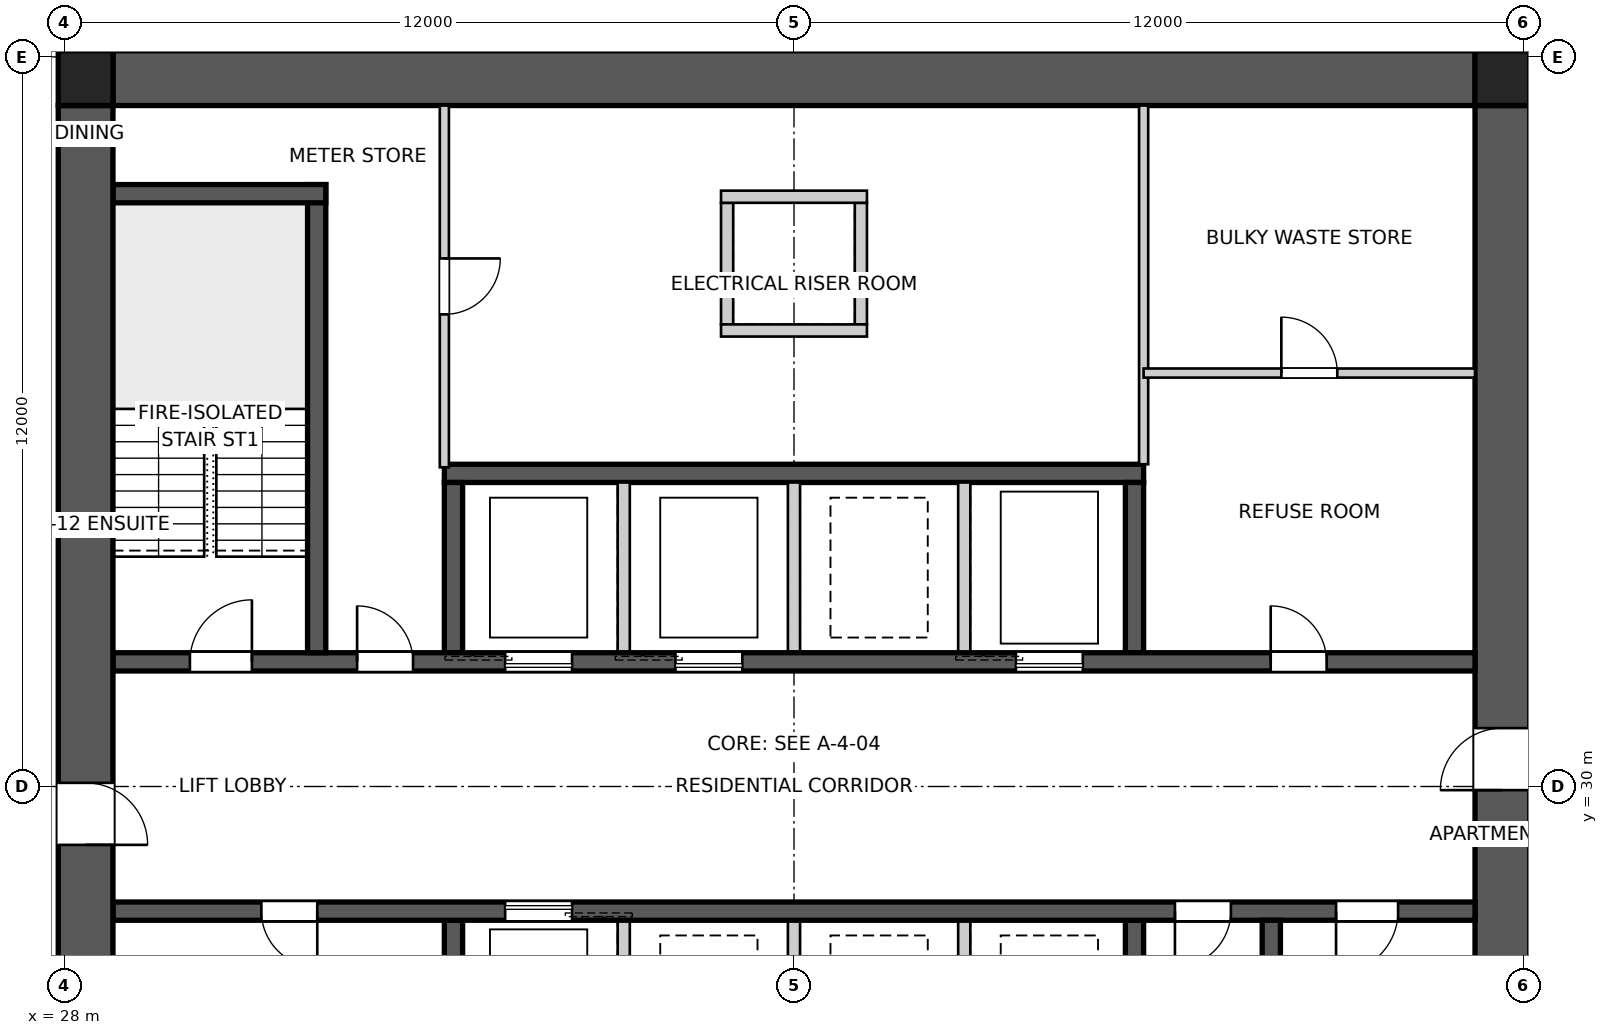
"""IFC4 building model, lengths in metres.
Left out: names, types, materials, properties, quantities, classifications, styles, units other than length and angle.
Written with IfcOpenShell. Run it as: python <this file> out.ifc"""

import sys

from ifc_helpers import new_model, si_unit, direction, frame, frame_2d, origin, origin_2d, place, context, subcontext, project, spatial, polyline, rectangle, outline, extrude, element, fill, save


model = new_model("IFC4")
c1 = context("Model", 3, precision=1e-05, world=origin(), true_north=direction((0.0, 1.0)))
c2 = subcontext(c1, "Body", "Model", "MODEL_VIEW")
j1 = project(units=[si_unit("LENGTHUNIT", "METRE"), si_unit("PLANEANGLEUNIT", "RADIAN")], contexts=[c1])
p1 = place(None, origin())
s1 = spatial("IfcSite", under=j1, at=p1, CompositionType="ELEMENT")
p2 = place(p1, origin())
s2 = spatial("IfcBuilding", under=s1, at=p2, CompositionType="ELEMENT")
p3 = place(p2, frame((0.0, 0.0, 21.8)))
s3 = spatial("IfcBuildingStorey", under=s2, at=p3, CompositionType="ELEMENT", Elevation=21.8)
p4 = place(p3, frame((28.8, 41.65, 0.0), z_axis=(0.0, 0.0, 1.0), x_axis=(1.0, 0.0, 0.0)))
e1 = element("IfcWall", 1, at=p4, inside=s3, PredefinedType="SHEAR", context=c2, shape_type="SweptSolid", body=[
    extrude(outline(polyline([(0.0, -0.45), (22.4, -0.45), (22.4, -0.025), (22.85, -0.025), (22.85, 0.025), (22.4, 0.025), (22.4, 0.45), (0.0, 0.45), (0.0, 0.025), (-0.45, 0.025), (-0.45, -0.025), (0.0, -0.025), (0.0, -0.45)])), origin(), (0.0, 0.0, 1.0), 3.4),
])
p5 = place(p3, frame((51.65, 18.8, 0.0), z_axis=(0.0, 0.0, 1.0), x_axis=(0.0, 1.0, 0.0)))
e2 = element("IfcWall", 2, at=p5, inside=s3, PredefinedType="SHEAR", context=c2, shape_type="SweptSolid", body=[
    extrude(outline(polyline([(0.0, -0.45), (22.4, -0.45), (22.4, -0.025), (22.85, -0.025), (22.85, 0.025), (22.4, 0.025), (22.4, 0.45), (0.0, 0.45), (0.0, 0.025), (-0.45, 0.025), (-0.45, -0.025), (0.0, -0.025), (0.0, -0.45)])), origin(), (0.0, 0.0, 1.0), 3.4),
])
p6 = place(p5, frame((11.14, 0.0, 0.0)))
e3 = element("IfcOpeningElement", 3, at=p6, cuts=e2, PredefinedType="OPENING", context=c2, shape_type="SweptSolid", body=[
    extrude(rectangle(XDim=1.02, YDim=2.4, at=frame_2d((0.51, 1.2))), frame((0.0, 0.46, 0.0), z_axis=(0.0, -1.0, 0.0), x_axis=(1.0, 0.0, 0.0)), (0.0, 0.0, 1.0), 0.92),
])
p7 = place(p3, frame((28.35, 41.2, 0.0), z_axis=(0.0, 0.0, 1.0), x_axis=(0.0, -1.0, 0.0)))
e4 = element("IfcWall", 4, at=p7, inside=s3, PredefinedType="SHEAR", context=c2, shape_type="SweptSolid", body=[
    extrude(outline(polyline([(0.0, -0.45), (22.4, -0.45), (22.4, -0.025), (22.85, -0.025), (22.85, 0.025), (22.4, 0.025), (22.4, 0.45), (0.0, 0.45), (0.0, 0.025), (-0.45, 0.025), (-0.45, -0.025), (0.0, -0.025), (0.0, -0.45)])), origin(), (0.0, 0.0, 1.0), 3.4),
])
p8 = place(p7, frame((11.14, 0.0, 0.0)))
e5 = element("IfcOpeningElement", 5, at=p8, cuts=e4, PredefinedType="OPENING", context=c2, shape_type="SweptSolid", body=[
    extrude(rectangle(XDim=1.02, YDim=2.4, at=frame_2d((0.51, 1.2))), frame((0.0, 0.46, 0.0), z_axis=(0.0, -1.0, 0.0), x_axis=(1.0, 0.0, 0.0)), (0.0, 0.0, 1.0), 0.92),
])
p9 = place(p3, frame((28.8, 32.05, 0.0), z_axis=(0.0, 0.0, 1.0), x_axis=(1.0, 0.0, 0.0)))
e6 = element("IfcWall", 6, at=p9, inside=s3, PredefinedType="SHEAR", context=c2, shape_type="SweptSolid", body=[
    extrude(rectangle(XDim=22.4, YDim=0.3, at=frame_2d((11.2, 0.0))), origin(), (0.0, 0.0, 1.0), 3.4),
])
p10 = place(p9, frame((19.04, 0.0, 0.0)))
e7 = element("IfcOpeningElement", 7, at=p10, cuts=e6, PredefinedType="OPENING", context=c2, shape_type="SweptSolid", body=[
    extrude(rectangle(XDim=0.92, YDim=2.1, at=frame_2d((0.46, 1.05))), frame((0.0, 0.16, 0.0), z_axis=(0.0, -1.0, 0.0), x_axis=(1.0, 0.0, 0.0)), (0.0, 0.0, 1.0), 0.32),
])
p11 = place(p9, frame((1.265, 0.0, 0.0)))
e8 = element("IfcOpeningElement", 8, at=p11, cuts=e6, PredefinedType="OPENING", context=c2, shape_type="SweptSolid", body=[
    extrude(rectangle(XDim=1.02, YDim=2.1, at=frame_2d((0.51, 1.05))), frame((0.0, 0.16, 0.0), z_axis=(0.0, -1.0, 0.0), x_axis=(1.0, 0.0, 0.0)), (0.0, 0.0, 1.0), 0.32),
])
p12 = place(p9, frame((4.015, 0.0, 0.0)))
e9 = element("IfcOpeningElement", 9, at=p12, cuts=e6, PredefinedType="OPENING", context=c2, shape_type="SweptSolid", body=[
    extrude(rectangle(XDim=0.92, YDim=2.1, at=frame_2d((0.46, 1.05))), frame((0.0, 0.16, 0.0), z_axis=(0.0, -1.0, 0.0), x_axis=(1.0, 0.0, 0.0)), (0.0, 0.0, 1.0), 0.32),
])
p13 = place(p9, frame((6.45, 0.0, 0.0)))
e10 = element("IfcOpeningElement", 10, at=p13, cuts=e6, PredefinedType="OPENING", context=c2, shape_type="SweptSolid", body=[
    extrude(rectangle(XDim=1.1, YDim=2.1, at=frame_2d((0.55, 1.05))), frame((0.0, 0.16, 0.0), z_axis=(0.0, -1.0, 0.0), x_axis=(1.0, 0.0, 0.0)), (0.0, 0.0, 1.0), 0.32),
])
p14 = place(p9, frame((9.25, 0.0, 0.0)))
e11 = element("IfcOpeningElement", 11, at=p14, cuts=e6, PredefinedType="OPENING", context=c2, shape_type="SweptSolid", body=[
    extrude(rectangle(XDim=1.1, YDim=2.1, at=frame_2d((0.55, 1.05))), frame((0.0, 0.16, 0.0), z_axis=(0.0, -1.0, 0.0), x_axis=(1.0, 0.0, 0.0)), (0.0, 0.0, 1.0), 0.32),
])
p15 = place(p9, frame((14.85, 0.0, 0.0)))
e12 = element("IfcOpeningElement", 12, at=p15, cuts=e6, PredefinedType="OPENING", context=c2, shape_type="SweptSolid", body=[
    extrude(rectangle(XDim=1.1, YDim=2.1, at=frame_2d((0.55, 1.05))), frame((0.0, 0.16, 0.0), z_axis=(0.0, -1.0, 0.0), x_axis=(1.0, 0.0, 0.0)), (0.0, 0.0, 1.0), 0.32),
])
p16 = place(p3, frame((51.2, 27.95, 0.0), z_axis=(0.0, 0.0, 1.0), x_axis=(-1.0, 0.0, 0.0)))
e13 = element("IfcWall", 13, at=p16, inside=s3, PredefinedType="SHEAR", context=c2, shape_type="SweptSolid", body=[
    extrude(rectangle(XDim=22.4, YDim=0.3, at=frame_2d((11.2, 0.0))), origin(), (0.0, 0.0, 1.0), 3.4),
])
p17 = place(p16, frame((19.04, 0.0, 0.0)))
e14 = element("IfcOpeningElement", 14, at=p17, cuts=e13, PredefinedType="OPENING", context=c2, shape_type="SweptSolid", body=[
    extrude(rectangle(XDim=0.92, YDim=2.1, at=frame_2d((0.46, 1.05))), frame((0.0, 0.16, 0.0), z_axis=(0.0, -1.0, 0.0), x_axis=(1.0, 0.0, 0.0)), (0.0, 0.0, 1.0), 0.32),
])
p18 = place(p16, frame((1.265, 0.0, 0.0)))
e15 = element("IfcOpeningElement", 15, at=p18, cuts=e13, PredefinedType="OPENING", context=c2, shape_type="SweptSolid", body=[
    extrude(rectangle(XDim=1.02, YDim=2.1, at=frame_2d((0.51, 1.05))), frame((0.0, 0.16, 0.0), z_axis=(0.0, -1.0, 0.0), x_axis=(1.0, 0.0, 0.0)), (0.0, 0.0, 1.0), 0.32),
])
p19 = place(p16, frame((4.015, 0.0, 0.0)))
e16 = element("IfcOpeningElement", 16, at=p19, cuts=e13, PredefinedType="OPENING", context=c2, shape_type="SweptSolid", body=[
    extrude(rectangle(XDim=0.92, YDim=2.1, at=frame_2d((0.46, 1.05))), frame((0.0, 0.16, 0.0), z_axis=(0.0, -1.0, 0.0), x_axis=(1.0, 0.0, 0.0)), (0.0, 0.0, 1.0), 0.32),
])
p20 = place(p16, frame((14.85, 0.0, 0.0)))
e17 = element("IfcOpeningElement", 17, at=p20, cuts=e13, PredefinedType="OPENING", context=c2, shape_type="SweptSolid", body=[
    extrude(rectangle(XDim=1.1, YDim=2.1, at=frame_2d((0.55, 1.05))), frame((0.0, 0.16, 0.0), z_axis=(0.0, -1.0, 0.0), x_axis=(1.0, 0.0, 0.0)), (0.0, 0.0, 1.0), 0.32),
])
p21 = place(p3, frame((34.25, 35.15, 0.0), z_axis=(0.0, 0.0, 1.0), x_axis=(1.0, 0.0, 0.0)))
e18 = element("IfcWall", 18, at=p21, inside=s3, PredefinedType="SHEAR", context=c2, shape_type="SweptSolid", body=[
    extrude(rectangle(XDim=11.5, YDim=0.3, at=frame_2d((5.75, 0.0))), origin(), (0.0, 0.0, 1.0), 3.4),
])
for number, where, z_axis, x_axis in (
    (19, (34.4, 32.2, 0.0), (0.0, 0.0, 1.0), (0.0, 1.0, 0.0)),
    (20, (45.6, 27.8, 0.0), (0.0, 0.0, 1.0), (0.0, -1.0, 0.0)),
):
    element("IfcWall", number, at=place(p3, frame(where, z_axis=z_axis, x_axis=x_axis)), inside=s3, PredefinedType="SHEAR", context=c2, shape_type="SweptSolid", body=[
        extrude(rectangle(XDim=2.8, YDim=0.3, at=frame_2d((1.4, 0.0))), origin(), (0.0, 0.0, 1.0), 3.4),
    ])
for number, where, z_axis, x_axis in (
    (21, (37.2, 32.2, 0.0), (0.0, 0.0, 1.0), (0.0, 1.0, 0.0)),
    (22, (42.8, 27.8, 0.0), (0.0, 0.0, 1.0), (0.0, -1.0, 0.0)),
    (23, (40.0, 32.2, 0.0), (0.0, 0.0, 1.0), (0.0, 1.0, 0.0)),
    (24, (40.0, 27.8, 0.0), (0.0, 0.0, 1.0), (0.0, -1.0, 0.0)),
    (25, (42.8, 32.2, 0.0), (0.0, 0.0, 1.0), (0.0, 1.0, 0.0)),
    (26, (37.2, 27.8, 0.0), (0.0, 0.0, 1.0), (0.0, -1.0, 0.0)),
):
    element("IfcWall", number, at=place(p3, frame(where, z_axis=z_axis, x_axis=x_axis)), inside=s3, PredefinedType="SOLIDWALL", context=c2, shape_type="SweptSolid", body=[
        extrude(rectangle(XDim=2.8, YDim=0.2, at=frame_2d((1.4, 0.0))), origin(), (0.0, 0.0, 1.0), 3.4),
    ])
for number, where, z_axis, x_axis in (
    (27, (45.6, 32.2, 0.0), (0.0, 0.0, 1.0), (0.0, 1.0, 0.0)),
    (28, (34.4, 27.8, 0.0), (0.0, 0.0, 1.0), (0.0, -1.0, 0.0)),
):
    element("IfcWall", number, at=place(p3, frame(where, z_axis=z_axis, x_axis=x_axis)), inside=s3, PredefinedType="SHEAR", context=c2, shape_type="SweptSolid", body=[
        extrude(rectangle(XDim=2.8, YDim=0.3, at=frame_2d((1.4, 0.0))), origin(), (0.0, 0.0, 1.0), 3.4),
    ])
p22 = place(p3, frame((32.15, 32.2, 0.0), z_axis=(0.0, 0.0, 1.0), x_axis=(0.0, 1.0, 0.0)))
e29 = element("IfcWall", 29, at=p22, inside=s3, PredefinedType="SHEAR", context=c2, shape_type="SweptSolid", body=[
    extrude(rectangle(XDim=7.7, YDim=0.3, at=frame_2d((3.85, 0.0))), origin(), (0.0, 0.0, 1.0), 3.4),
])
p23 = place(p3, frame((28.8, 39.75, 0.0), z_axis=(0.0, 0.0, 1.0), x_axis=(1.0, 0.0, 0.0)))
e30 = element("IfcWall", 30, at=p23, inside=s3, PredefinedType="SHEAR", context=c2, shape_type="SweptSolid", body=[
    extrude(rectangle(XDim=3.5, YDim=0.3, at=frame_2d((1.75, 0.0))), origin(), (0.0, 0.0, 1.0), 3.4),
])
p24 = place(p3, frame((47.85, 27.8, 0.0), z_axis=(0.0, 0.0, 1.0), x_axis=(0.0, -1.0, 0.0)))
e31 = element("IfcWall", 31, at=p24, inside=s3, PredefinedType="SHEAR", context=c2, shape_type="SweptSolid", body=[
    extrude(rectangle(XDim=7.7, YDim=0.3, at=frame_2d((3.85, 0.0))), origin(), (0.0, 0.0, 1.0), 3.4),
])
for number, where, z_axis, x_axis in (
    (32, (38.9, 37.6, 0.0), (0.0, 0.0, 1.0), (0.0, 1.0, 0.0)),
    (33, (41.1, 37.6, 0.0), (0.0, 0.0, 1.0), (0.0, 1.0, 0.0)),
):
    element("IfcWall", number, at=place(p3, frame(where, z_axis=z_axis, x_axis=x_axis)), inside=s3, PredefinedType="SOLIDWALL", context=c2, shape_type="SweptSolid", body=[
        extrude(rectangle(XDim=2.0, YDim=0.2, at=frame_2d((1.0, 0.0))), origin(), (0.0, 0.0, 1.0), 3.4),
    ])
for number, where, z_axis, x_axis in (
    (34, (38.8, 37.5, 0.0), (0.0, 0.0, 1.0), (1.0, 0.0, 0.0)),
    (35, (38.8, 39.7, 0.0), (0.0, 0.0, 1.0), (1.0, 0.0, 0.0)),
):
    element("IfcWall", number, at=place(p3, frame(where, z_axis=z_axis, x_axis=x_axis)), inside=s3, PredefinedType="SOLIDWALL", context=c2, shape_type="SweptSolid", body=[
        extrude(rectangle(XDim=2.4, YDim=0.2, at=frame_2d((1.2, 0.0))), origin(), (0.0, 0.0, 1.0), 3.4),
    ])
for number, where, z_axis, x_axis in (
    (36, (51.65, 41.65, 0.0), (0.0, 0.0, 1.0), (1.0, 0.0, 0.0)),
    (37, (28.35, 41.65, 0.0), (0.0, 0.0, 1.0), (1.0, 0.0, 0.0)),
):
    element("IfcColumn", number, at=place(p3, frame(where, z_axis=z_axis, x_axis=x_axis)), inside=s3, PredefinedType="COLUMN", context=c2, shape_type="SweptSolid", body=[
        extrude(rectangle(XDim=0.9, YDim=0.9, at=origin_2d()), origin(), (0.0, 0.0, 1.0), 3.4),
    ])
p25 = place(p3, frame((34.25, 41.2, 0.0), z_axis=(0.0, 0.0, 1.0), x_axis=(0.0, -1.0, 0.0)))
e38 = element("IfcWall", 38, at=p25, inside=s3, PredefinedType="SOLIDWALL", context=c2, shape_type="SweptSolid", body=[
    extrude(rectangle(XDim=5.95, YDim=0.15, at=frame_2d((2.975, 0.0))), origin(), (0.0, 0.0, 1.0), 3.25),
])
p26 = place(p25, frame((2.515, 0.0, 0.0)))
e39 = element("IfcOpeningElement", 39, at=p26, cuts=e38, PredefinedType="OPENING", context=c2, shape_type="SweptSolid", body=[
    extrude(rectangle(XDim=0.92, YDim=2.1, at=frame_2d((0.46, 1.05))), frame((0.0, 0.085, 0.0), z_axis=(0.0, -1.0, 0.0), x_axis=(1.0, 0.0, 0.0)), (0.0, 0.0, 1.0), 0.17),
])
p27 = place(p3, frame((45.75, 41.2, 0.0), z_axis=(0.0, 0.0, 1.0), x_axis=(0.0, -1.0, 0.0)))
e40 = element("IfcWall", 40, at=p27, inside=s3, PredefinedType="SOLIDWALL", context=c2, shape_type="SweptSolid", body=[
    extrude(rectangle(XDim=5.9, YDim=0.15, at=frame_2d((2.95, 0.0))), origin(), (0.0, 0.0, 1.0), 3.25),
])
p28 = place(p3, frame((45.75, 36.8, 0.0), z_axis=(0.0, 0.0, 1.0), x_axis=(1.0, 0.0, 0.0)))
e41 = element("IfcWall", 41, at=p28, inside=s3, PredefinedType="SOLIDWALL", context=c2, shape_type="SweptSolid", body=[
    extrude(rectangle(XDim=5.45, YDim=0.15, at=frame_2d((2.725, 0.0))), origin(), (0.0, 0.0, 1.0), 3.25),
])
p29 = place(p28, frame((2.265, 0.0, 0.0)))
e42 = element("IfcOpeningElement", 42, at=p29, cuts=e41, PredefinedType="OPENING", context=c2, shape_type="SweptSolid", body=[
    extrude(rectangle(XDim=0.92, YDim=2.1, at=frame_2d((0.46, 1.05))), frame((0.0, 0.085, 0.0), z_axis=(0.0, -1.0, 0.0), x_axis=(1.0, 0.0, 0.0)), (0.0, 0.0, 1.0), 0.17),
])
p30 = place(p10, origin())
e43 = element("IfcDoor", 43, at=p30, inside=s3, OperationType="SINGLE_SWING_LEFT", PredefinedType="DOOR", context=c2, shape_type="SweptSolid", body=[
    extrude(rectangle(XDim=0.92, YDim=2.1, at=frame_2d((0.46, 1.05))), frame((0.0, 0.025, 0.0), z_axis=(0.0, -1.0, 0.0), x_axis=(1.0, 0.0, 0.0)), (0.0, 0.0, 1.0), 0.05),
])
fill(e7, e43)
p31 = place(p17, origin())
e44 = element("IfcDoor", 44, at=p31, inside=s3, OperationType="SINGLE_SWING_LEFT", PredefinedType="DOOR", context=c2, shape_type="SweptSolid", body=[
    extrude(rectangle(XDim=0.92, YDim=2.1, at=frame_2d((0.46, 1.05))), frame((0.0, 0.025, 0.0), z_axis=(0.0, -1.0, 0.0), x_axis=(1.0, 0.0, 0.0)), (0.0, 0.0, 1.0), 0.05),
])
fill(e14, e44)
p32 = place(p18, origin())
e45 = element("IfcDoor", 45, at=p32, inside=s3, OperationType="SINGLE_SWING_RIGHT", PredefinedType="DOOR", context=c2, shape_type="SweptSolid", body=[
    extrude(rectangle(XDim=1.02, YDim=2.1, at=frame_2d((0.51, 1.05))), frame((0.0, 0.025, 0.0), z_axis=(0.0, -1.0, 0.0), x_axis=(1.0, 0.0, 0.0)), (0.0, 0.0, 1.0), 0.05),
])
fill(e15, e45)
p33 = place(p11, origin())
e46 = element("IfcDoor", 46, at=p33, inside=s3, OperationType="SINGLE_SWING_RIGHT", PredefinedType="DOOR", context=c2, shape_type="SweptSolid", body=[
    extrude(rectangle(XDim=1.02, YDim=2.1, at=frame_2d((0.51, 1.05))), frame((0.0, 0.025, 0.0), z_axis=(0.0, -1.0, 0.0), x_axis=(1.0, 0.0, 0.0)), (0.0, 0.0, 1.0), 0.05),
])
fill(e8, e46)
p34 = place(p12, origin())
e47 = element("IfcDoor", 47, at=p34, inside=s3, OperationType="SINGLE_SWING_LEFT", PredefinedType="DOOR", context=c2, shape_type="SweptSolid", body=[
    extrude(rectangle(XDim=0.92, YDim=2.1, at=frame_2d((0.46, 1.05))), frame((0.0, 0.025, 0.0), z_axis=(0.0, -1.0, 0.0), x_axis=(1.0, 0.0, 0.0)), (0.0, 0.0, 1.0), 0.05),
])
fill(e9, e47)
p35 = place(p19, origin())
e48 = element("IfcDoor", 48, at=p35, inside=s3, OperationType="SINGLE_SWING_RIGHT", PredefinedType="DOOR", context=c2, shape_type="SweptSolid", body=[
    extrude(rectangle(XDim=0.92, YDim=2.1, at=frame_2d((0.46, 1.05))), frame((0.0, 0.025, 0.0), z_axis=(0.0, -1.0, 0.0), x_axis=(1.0, 0.0, 0.0)), (0.0, 0.0, 1.0), 0.05),
])
fill(e16, e48)
p36 = place(p29, origin())
e49 = element("IfcDoor", 49, at=p36, inside=s3, OperationType="SINGLE_SWING_LEFT", PredefinedType="DOOR", context=c2, shape_type="SweptSolid", body=[
    extrude(rectangle(XDim=0.92, YDim=2.1, at=frame_2d((0.46, 1.05))), frame((0.0, 0.025, 0.0), z_axis=(0.0, -1.0, 0.0), x_axis=(1.0, 0.0, 0.0)), (0.0, 0.0, 1.0), 0.05),
])
fill(e42, e49)
p37 = place(p26, origin())
e50 = element("IfcDoor", 50, at=p37, inside=s3, OperationType="SINGLE_SWING_LEFT", PredefinedType="DOOR", context=c2, shape_type="SweptSolid", body=[
    extrude(rectangle(XDim=0.92, YDim=2.1, at=frame_2d((0.46, 1.05))), frame((0.0, 0.025, 0.0), z_axis=(0.0, -1.0, 0.0), x_axis=(1.0, 0.0, 0.0)), (0.0, 0.0, 1.0), 0.05),
])
fill(e39, e50)
p38 = place(p6, origin())
e51 = element("IfcDoor", 51, at=p38, inside=s3, OperationType="SINGLE_SWING_LEFT", PredefinedType="DOOR", context=c2, shape_type="SweptSolid", body=[
    extrude(rectangle(XDim=1.02, YDim=2.4, at=frame_2d((0.51, 1.2))), frame((0.0, 0.025, 0.0), z_axis=(0.0, -1.0, 0.0), x_axis=(1.0, 0.0, 0.0)), (0.0, 0.0, 1.0), 0.05),
])
fill(e3, e51)
p39 = place(p8, origin())
e52 = element("IfcDoor", 52, at=p39, inside=s3, OperationType="SINGLE_SWING_RIGHT", PredefinedType="DOOR", context=c2, shape_type="SweptSolid", body=[
    extrude(rectangle(XDim=1.02, YDim=2.4, at=frame_2d((0.51, 1.2))), frame((0.0, 0.025, 0.0), z_axis=(0.0, -1.0, 0.0), x_axis=(1.0, 0.0, 0.0)), (0.0, 0.0, 1.0), 0.05),
])
fill(e5, e52)
p40 = place(p13, origin())
e53 = element("IfcDoor", 53, at=p40, inside=s3, OperationType="SLIDING_TO_LEFT", PredefinedType="DOOR", context=c2, shape_type="SweptSolid", body=[
    extrude(rectangle(XDim=1.1, YDim=2.1, at=frame_2d((0.55, 1.05))), frame((0.0, 0.025, 0.0), z_axis=(0.0, -1.0, 0.0), x_axis=(1.0, 0.0, 0.0)), (0.0, 0.0, 1.0), 0.05),
])
fill(e10, e53)
p41 = place(p14, origin())
e54 = element("IfcDoor", 54, at=p41, inside=s3, OperationType="SLIDING_TO_LEFT", PredefinedType="DOOR", context=c2, shape_type="SweptSolid", body=[
    extrude(rectangle(XDim=1.1, YDim=2.1, at=frame_2d((0.55, 1.05))), frame((0.0, 0.025, 0.0), z_axis=(0.0, -1.0, 0.0), x_axis=(1.0, 0.0, 0.0)), (0.0, 0.0, 1.0), 0.05),
])
fill(e11, e54)
p42 = place(p15, origin())
e55 = element("IfcDoor", 55, at=p42, inside=s3, OperationType="SLIDING_TO_LEFT", PredefinedType="DOOR", context=c2, shape_type="SweptSolid", body=[
    extrude(rectangle(XDim=1.1, YDim=2.1, at=frame_2d((0.55, 1.05))), frame((0.0, 0.025, 0.0), z_axis=(0.0, -1.0, 0.0), x_axis=(1.0, 0.0, 0.0)), (0.0, 0.0, 1.0), 0.05),
])
fill(e12, e55)
p43 = place(p20, origin())
e56 = element("IfcDoor", 56, at=p43, inside=s3, OperationType="SLIDING_TO_LEFT", PredefinedType="DOOR", context=c2, shape_type="SweptSolid", body=[
    extrude(rectangle(XDim=1.1, YDim=2.1, at=frame_2d((0.55, 1.05))), frame((0.0, 0.025, 0.0), z_axis=(0.0, -1.0, 0.0), x_axis=(1.0, 0.0, 0.0)), (0.0, 0.0, 1.0), 0.05),
])
fill(e17, e56)
save(model, sys.argv[1])
